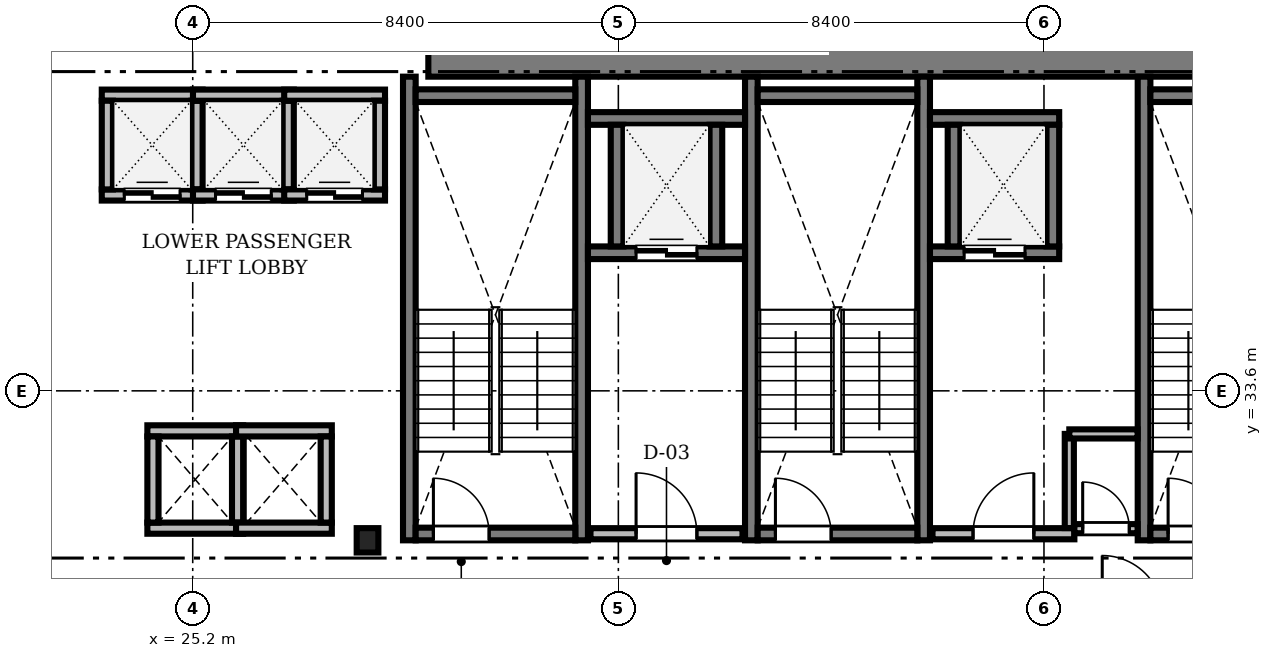
"""IFC4 building model, lengths in metres.
Left out: names, types, materials, properties, quantities, classifications, styles, units other than length and angle.
Written with IfcOpenShell. Run it as: python <this file> out.ifc"""

import sys

from ifc_helpers import new_model, si_unit, direction, frame, frame_2d, origin, origin_2d, place, context, subcontext, project, spatial, rectangle, i_section, extrude, source, transform, mapped, element, fill, save


model = new_model("IFC4")
c1 = context("Model", 3, precision=1e-05, world=origin(), true_north=direction((0.0, 1.0)))
c2 = subcontext(c1, "Body", "Model", "MODEL_VIEW")
j1 = project(units=[si_unit("LENGTHUNIT", "METRE"), si_unit("PLANEANGLEUNIT", "RADIAN")], contexts=[c1])
p1 = place(None, origin())
s1 = spatial("IfcSite", under=j1, at=p1, CompositionType="ELEMENT")
p2 = place(p1, origin())
s2 = spatial("IfcBuilding", under=s1, at=p2, CompositionType="ELEMENT")
p3 = place(p2, frame((0.0, 0.0, 89.65)))
s3 = spatial("IfcBuildingStorey", under=s2, at=p3, CompositionType="ELEMENT", Elevation=89.65)
m1 = source(origin(), c2, "Body", "SweptSolid", [
    extrude(rectangle(XDim=17.52, YDim=1.0, at=frame_2d((8.76, 0.0))), origin(), (0.0, 0.0, 1.0), 3.0),
])
p4 = place(p3, frame((29.85, 40.3, 0.0), z_axis=(0.0, 0.0, 1.0), x_axis=(1.0, 0.0, 0.0)))
e1 = element("IfcWall", 1, at=p4, inside=s3, PredefinedType="SHEAR", context=c2, shape_type="MappedRepresentation", body=[
    mapped(m1, transform((0.0, 0.0, 0.0), scale=1.0)),
])
m2 = source(origin(), c2, "Body", "SweptSolid", [
    extrude(i_section(OverallWidth=0.428, OverallDepth=0.481, WebThickness=0.04, FlangeThickness=0.063, FilletRadius=0.015, at=origin_2d()), origin(), (0.0, 0.0, 1.0), 3.0),
])
p5 = place(p3, frame((28.65, 30.65, 0.0), z_axis=(0.0, 0.0, 1.0), x_axis=(1.0, 0.0, 0.0)))
e2 = element("IfcColumn", 2, at=p5, inside=s3, PredefinedType="COLUMN", context=c2, shape_type="MappedRepresentation", body=[
    mapped(m2, transform((0.0, 0.0, 0.0), scale=1.0)),
])
m3 = source(origin(), c2, "Body", "SweptSolid", [
    extrude(rectangle(XDim=9.15, YDim=0.25, at=frame_2d((4.575, 0.0))), origin(), (0.0, 0.0, 1.0), 3.45),
])
for number, where, z_axis, x_axis in (
    (3, (29.475, 30.65, 0.0), (0.0, 0.0, 1.0), (0.0, 1.0, 0.0)),
    (4, (32.875, 30.65, 0.0), (0.0, 0.0, 1.0), (0.0, 1.0, 0.0)),
):
    element("IfcWall", number, at=place(p3, frame(where, z_axis=z_axis, x_axis=x_axis)), inside=s3, PredefinedType="SOLIDWALL", context=c2, shape_type="MappedRepresentation", body=[
        mapped(m3, transform((0.0, 0.0, 0.0), scale=1.0)),
    ])
m4 = source(origin(), c2, "Body", "SweptSolid", [
    extrude(rectangle(XDim=3.15, YDim=0.25, at=frame_2d((1.575, 0.0))), origin(), (0.0, 0.0, 1.0), 3.45),
])
p6 = place(p3, frame((29.6, 39.425, 0.0), z_axis=(0.0, 0.0, 1.0), x_axis=(1.0, 0.0, 0.0)))
e5 = element("IfcWall", 5, at=p6, inside=s3, PredefinedType="SOLIDWALL", context=c2, shape_type="MappedRepresentation", body=[
    mapped(m4, transform((0.0, 0.0, 0.0), scale=1.0)),
])
p7 = place(p3, frame((29.6, 30.775, 0.0), z_axis=(0.0, 0.0, 1.0), x_axis=(1.0, 0.0, 0.0)))
e6 = element("IfcWall", 6, at=p7, inside=s3, PredefinedType="SOLIDWALL", context=c2, shape_type="MappedRepresentation", body=[
    mapped(m4, transform((0.0, 0.0, 0.0), scale=1.0)),
])
m5 = source(origin(), c2, "Body", "SweptSolid", [
    extrude(rectangle(XDim=1.1, YDim=2.2, at=frame_2d((0.55, 1.1))), frame((0.0, 0.135, 0.0), z_axis=(0.0, -1.0, 0.0), x_axis=(1.0, 0.0, 0.0)), (0.0, 0.0, 1.0), 0.27),
])
p8 = place(p7, frame((0.35, 0.0, 0.0)))
e7 = element("IfcOpeningElement", 7, at=p8, cuts=e6, PredefinedType="OPENING", context=c2, shape_type="MappedRepresentation", body=[
    mapped(m5, transform((0.0, 0.0, 0.0), scale=1.0)),
])
for number, where, z_axis, x_axis in (
    (8, (36.225, 30.65, 0.0), (0.0, 0.0, 1.0), (0.0, 1.0, 0.0)),
    (9, (39.625, 30.65, 0.0), (0.0, 0.0, 1.0), (0.0, 1.0, 0.0)),
):
    element("IfcWall", number, at=place(p3, frame(where, z_axis=z_axis, x_axis=x_axis)), inside=s3, PredefinedType="SOLIDWALL", context=c2, shape_type="MappedRepresentation", body=[
        mapped(m3, transform((0.0, 0.0, 0.0), scale=1.0)),
    ])
p9 = place(p3, frame((36.35, 39.425, 0.0), z_axis=(0.0, 0.0, 1.0), x_axis=(1.0, 0.0, 0.0)))
e10 = element("IfcWall", 10, at=p9, inside=s3, PredefinedType="SOLIDWALL", context=c2, shape_type="MappedRepresentation", body=[
    mapped(m4, transform((0.0, 0.0, 0.0), scale=1.0)),
])
p10 = place(p3, frame((36.35, 30.775, 0.0), z_axis=(0.0, 0.0, 1.0), x_axis=(1.0, 0.0, 0.0)))
e11 = element("IfcWall", 11, at=p10, inside=s3, PredefinedType="SOLIDWALL", context=c2, shape_type="MappedRepresentation", body=[
    mapped(m4, transform((0.0, 0.0, 0.0), scale=1.0)),
])
p11 = place(p10, frame((0.35, 0.0, 0.0)))
e12 = element("IfcOpeningElement", 12, at=p11, cuts=e11, PredefinedType="OPENING", context=c2, shape_type="MappedRepresentation", body=[
    mapped(m5, transform((0.0, 0.0, 0.0), scale=1.0)),
])
p12 = place(p3, frame((43.975, 30.65, 0.0), z_axis=(0.0, 0.0, 1.0), x_axis=(0.0, 1.0, 0.0)))
e13 = element("IfcWall", 13, at=p12, inside=s3, PredefinedType="SOLIDWALL", context=c2, shape_type="MappedRepresentation", body=[
    mapped(m3, transform((0.0, 0.0, 0.0), scale=1.0)),
])
p13 = place(p3, frame((44.1, 39.425, 0.0), z_axis=(0.0, 0.0, 1.0), x_axis=(1.0, 0.0, 0.0)))
e14 = element("IfcWall", 14, at=p13, inside=s3, PredefinedType="SOLIDWALL", context=c2, shape_type="MappedRepresentation", body=[
    mapped(m4, transform((0.0, 0.0, 0.0), scale=1.0)),
])
p14 = place(p3, frame((44.1, 30.775, 0.0), z_axis=(0.0, 0.0, 1.0), x_axis=(1.0, 0.0, 0.0)))
e15 = element("IfcWall", 15, at=p14, inside=s3, PredefinedType="SOLIDWALL", context=c2, shape_type="MappedRepresentation", body=[
    mapped(m4, transform((0.0, 0.0, 0.0), scale=1.0)),
])
p15 = place(p14, frame((0.35, 0.0, 0.0)))
e16 = element("IfcOpeningElement", 16, at=p15, cuts=e15, PredefinedType="OPENING", context=c2, shape_type="MappedRepresentation", body=[
    mapped(m5, transform((0.0, 0.0, 0.0), scale=1.0)),
])
m6 = source(origin(), c2, "Body", "SweptSolid", [
    extrude(rectangle(XDim=3.0, YDim=0.22, at=frame_2d((1.5, 0.0))), origin(), (0.0, 0.0, 1.0), 3.0),
])
p16 = place(p3, frame((33.05, 30.78, 0.0), z_axis=(0.0, 0.0, 1.0), x_axis=(1.0, 0.0, 0.0)))
e17 = element("IfcWall", 17, at=p16, inside=s3, PredefinedType="SOLIDWALL", context=c2, shape_type="MappedRepresentation", body=[
    mapped(m6, transform((0.0, 0.0, 0.0), scale=1.0)),
])
m7 = source(origin(), c2, "Body", "SweptSolid", [
    extrude(rectangle(XDim=1.2, YDim=2.2, at=frame_2d((0.6, 1.1))), frame((0.0, 0.12, 0.0), z_axis=(0.0, -1.0, 0.0), x_axis=(1.0, 0.0, 0.0)), (0.0, 0.0, 1.0), 0.24),
])
p17 = place(p16, frame((0.9, 0.0, 0.0)))
e18 = element("IfcOpeningElement", 18, at=p17, cuts=e17, PredefinedType="OPENING", context=c2, shape_type="MappedRepresentation", body=[
    mapped(m7, transform((0.0, 0.0, 0.0), scale=1.0)),
])
m8 = source(origin(), c2, "Body", "SweptSolid", [
    extrude(rectangle(XDim=2.8, YDim=0.22, at=frame_2d((1.4, 0.0))), origin(), (0.0, 0.0, 1.0), 3.0),
])
p18 = place(p3, frame((39.8, 30.78, 0.0), z_axis=(0.0, 0.0, 1.0), x_axis=(1.0, 0.0, 0.0)))
e19 = element("IfcWall", 19, at=p18, inside=s3, PredefinedType="SOLIDWALL", context=c2, shape_type="MappedRepresentation", body=[
    mapped(m8, transform((0.0, 0.0, 0.0), scale=1.0)),
])
p19 = place(p18, frame((0.8, 0.0, 0.0)))
e20 = element("IfcOpeningElement", 20, at=p19, cuts=e19, PredefinedType="OPENING", context=c2, shape_type="MappedRepresentation", body=[
    mapped(m7, transform((0.0, 0.0, 0.0), scale=1.0)),
])
m9 = source(origin(), c2, "Body", "SweptSolid", [
    extrude(rectangle(XDim=1.99, YDim=0.22, at=frame_2d((0.995, 0.0))), origin(), (0.0, 0.0, 1.0), 3.0),
])
p20 = place(p3, frame((23.405, 37.465, 0.0), z_axis=(0.0, 0.0, 1.0), x_axis=(1.0, 0.0, 0.0)))
e21 = element("IfcWall", 21, at=p20, inside=s3, PredefinedType="SOLIDWALL", context=c2, shape_type="MappedRepresentation", body=[
    mapped(m9, transform((0.0, 0.0, 0.0), scale=1.0)),
])
m10 = source(origin(), c2, "Body", "SweptSolid", [
    extrude(rectangle(XDim=1.1, YDim=2.2, at=frame_2d((0.55, 1.1))), frame((0.0, 0.12, 0.0), z_axis=(0.0, -1.0, 0.0), x_axis=(1.0, 0.0, 0.0)), (0.0, 0.0, 1.0), 0.24),
])
p21 = place(p20, frame((0.445, 0.0, 0.0)))
e22 = element("IfcOpeningElement", 22, at=p21, cuts=e21, PredefinedType="OPENING", context=c2, shape_type="MappedRepresentation", body=[
    mapped(m10, transform((0.0, 0.0, 0.0), scale=1.0)),
])
p22 = place(p3, frame((23.405, 39.435, 0.0), z_axis=(0.0, 0.0, 1.0), x_axis=(1.0, 0.0, 0.0)))
e23 = element("IfcWall", 23, at=p22, inside=s3, PredefinedType="SOLIDWALL", context=c2, shape_type="MappedRepresentation", body=[
    mapped(m9, transform((0.0, 0.0, 0.0), scale=1.0)),
])
m11 = source(origin(), c2, "Body", "SweptSolid", [
    extrude(rectangle(XDim=1.75, YDim=0.22, at=frame_2d((0.875, 0.0))), origin(), (0.0, 0.0, 1.0), 3.0),
])
for number, where, z_axis, x_axis in (
    (24, (23.515, 37.575, 0.0), (0.0, 0.0, 1.0), (0.0, 1.0, 0.0)),
    (25, (25.285, 37.575, 0.0), (0.0, 0.0, 1.0), (0.0, 1.0, 0.0)),
):
    element("IfcWall", number, at=place(p3, frame(where, z_axis=z_axis, x_axis=x_axis)), inside=s3, PredefinedType="SOLIDWALL", context=c2, shape_type="MappedRepresentation", body=[
        mapped(m11, transform((0.0, 0.0, 0.0), scale=1.0)),
    ])
p23 = place(p3, frame((25.205, 37.465, 0.0), z_axis=(0.0, 0.0, 1.0), x_axis=(1.0, 0.0, 0.0)))
e26 = element("IfcWall", 26, at=p23, inside=s3, PredefinedType="SOLIDWALL", context=c2, shape_type="MappedRepresentation", body=[
    mapped(m9, transform((0.0, 0.0, 0.0), scale=1.0)),
])
p24 = place(p23, frame((0.445, 0.0, 0.0)))
e27 = element("IfcOpeningElement", 27, at=p24, cuts=e26, PredefinedType="OPENING", context=c2, shape_type="MappedRepresentation", body=[
    mapped(m10, transform((0.0, 0.0, 0.0), scale=1.0)),
])
p25 = place(p3, frame((25.205, 39.435, 0.0), z_axis=(0.0, 0.0, 1.0), x_axis=(1.0, 0.0, 0.0)))
e28 = element("IfcWall", 28, at=p25, inside=s3, PredefinedType="SOLIDWALL", context=c2, shape_type="MappedRepresentation", body=[
    mapped(m9, transform((0.0, 0.0, 0.0), scale=1.0)),
])
p26 = place(p3, frame((27.085, 37.575, 0.0), z_axis=(0.0, 0.0, 1.0), x_axis=(0.0, 1.0, 0.0)))
e29 = element("IfcWall", 29, at=p26, inside=s3, PredefinedType="SOLIDWALL", context=c2, shape_type="MappedRepresentation", body=[
    mapped(m11, transform((0.0, 0.0, 0.0), scale=1.0)),
])
m12 = source(origin(), c2, "Body", "SweptSolid", [
    extrude(rectangle(XDim=1.99, YDim=0.22, at=frame_2d((0.995, 0.0))), origin(), (0.0, 0.0, 1.0), 3.0),
])
p27 = place(p3, frame((27.005, 37.465, 0.0), z_axis=(0.0, 0.0, 1.0), x_axis=(1.0, 0.0, 0.0)))
e30 = element("IfcWall", 30, at=p27, inside=s3, PredefinedType="SOLIDWALL", context=c2, shape_type="MappedRepresentation", body=[
    mapped(m12, transform((0.0, 0.0, 0.0), scale=1.0)),
])
p28 = place(p27, frame((0.445, 0.0, 0.0)))
e31 = element("IfcOpeningElement", 31, at=p28, cuts=e30, PredefinedType="OPENING", context=c2, shape_type="MappedRepresentation", body=[
    mapped(m10, transform((0.0, 0.0, 0.0), scale=1.0)),
])
p29 = place(p3, frame((27.005, 39.435, 0.0), z_axis=(0.0, 0.0, 1.0), x_axis=(1.0, 0.0, 0.0)))
e32 = element("IfcWall", 32, at=p29, inside=s3, PredefinedType="SOLIDWALL", context=c2, shape_type="MappedRepresentation", body=[
    mapped(m12, transform((0.0, 0.0, 0.0), scale=1.0)),
])
p30 = place(p3, frame((28.885, 37.575, 0.0), z_axis=(0.0, 0.0, 1.0), x_axis=(0.0, 1.0, 0.0)))
e33 = element("IfcWall", 33, at=p30, inside=s3, PredefinedType="SOLIDWALL", context=c2, shape_type="MappedRepresentation", body=[
    mapped(m11, transform((0.0, 0.0, 0.0), scale=1.0)),
])
m13 = source(origin(), c2, "Body", "SweptSolid", [
    extrude(rectangle(XDim=3.1, YDim=0.25, at=frame_2d((1.55, 0.0))), origin(), (0.0, 0.0, 1.0), 3.0),
])
p31 = place(p3, frame((33.0, 36.325, 0.0), z_axis=(0.0, 0.0, 1.0), x_axis=(1.0, 0.0, 0.0)))
e34 = element("IfcWall", 34, at=p31, inside=s3, PredefinedType="SOLIDWALL", context=c2, shape_type="MappedRepresentation", body=[
    mapped(m13, transform((0.0, 0.0, 0.0), scale=1.0)),
])
m14 = source(origin(), c2, "Body", "SweptSolid", [
    extrude(rectangle(XDim=1.2, YDim=2.25, at=frame_2d((0.6, 1.125))), frame((0.0, 0.135, 0.0), z_axis=(0.0, -1.0, 0.0), x_axis=(1.0, 0.0, 0.0)), (0.0, 0.0, 1.0), 0.27),
])
p32 = place(p31, frame((0.95, 0.0, 0.0)))
e35 = element("IfcOpeningElement", 35, at=p32, cuts=e34, PredefinedType="OPENING", context=c2, shape_type="MappedRepresentation", body=[
    mapped(m14, transform((0.0, 0.0, 0.0), scale=1.0)),
])
p33 = place(p3, frame((33.0, 38.975, 0.0), z_axis=(0.0, 0.0, 1.0), x_axis=(1.0, 0.0, 0.0)))
e36 = element("IfcWall", 36, at=p33, inside=s3, PredefinedType="SOLIDWALL", context=c2, shape_type="MappedRepresentation", body=[
    mapped(m13, transform((0.0, 0.0, 0.0), scale=1.0)),
])
m15 = source(origin(), c2, "Body", "SweptSolid", [
    extrude(rectangle(XDim=2.4, YDim=0.25, at=frame_2d((1.2, 0.0))), origin(), (0.0, 0.0, 1.0), 3.0),
])
for number, where, z_axis, x_axis in (
    (37, (33.575, 36.45, 0.0), (0.0, 0.0, 1.0), (0.0, 1.0, 0.0)),
    (38, (35.525, 36.45, 0.0), (0.0, 0.0, 1.0), (0.0, 1.0, 0.0)),
):
    element("IfcWall", number, at=place(p3, frame(where, z_axis=z_axis, x_axis=x_axis)), inside=s3, PredefinedType="SOLIDWALL", context=c2, shape_type="MappedRepresentation", body=[
        mapped(m15, transform((0.0, 0.0, 0.0), scale=1.0)),
    ])
m16 = source(origin(), c2, "Body", "SweptSolid", [
    extrude(rectangle(XDim=2.55, YDim=0.25, at=frame_2d((1.275, 0.0))), origin(), (0.0, 0.0, 1.0), 3.0),
])
p34 = place(p3, frame((39.75, 36.325, 0.0), z_axis=(0.0, 0.0, 1.0), x_axis=(1.0, 0.0, 0.0)))
e39 = element("IfcWall", 39, at=p34, inside=s3, PredefinedType="SOLIDWALL", context=c2, shape_type="MappedRepresentation", body=[
    mapped(m16, transform((0.0, 0.0, 0.0), scale=1.0)),
])
p35 = place(p34, frame((0.675, 0.0, 0.0)))
e40 = element("IfcOpeningElement", 40, at=p35, cuts=e39, PredefinedType="OPENING", context=c2, shape_type="MappedRepresentation", body=[
    mapped(m14, transform((0.0, 0.0, 0.0), scale=1.0)),
])
p36 = place(p3, frame((39.75, 38.975, 0.0), z_axis=(0.0, 0.0, 1.0), x_axis=(1.0, 0.0, 0.0)))
e41 = element("IfcWall", 41, at=p36, inside=s3, PredefinedType="SOLIDWALL", context=c2, shape_type="MappedRepresentation", body=[
    mapped(m16, transform((0.0, 0.0, 0.0), scale=1.0)),
])
for number, where, z_axis, x_axis in (
    (42, (40.225, 36.45, 0.0), (0.0, 0.0, 1.0), (0.0, 1.0, 0.0)),
    (43, (42.175, 36.45, 0.0), (0.0, 0.0, 1.0), (0.0, 1.0, 0.0)),
):
    element("IfcWall", number, at=place(p3, frame(where, z_axis=z_axis, x_axis=x_axis)), inside=s3, PredefinedType="SOLIDWALL", context=c2, shape_type="MappedRepresentation", body=[
        mapped(m15, transform((0.0, 0.0, 0.0), scale=1.0)),
    ])
m17 = source(origin(), c2, "Body", "SweptSolid", [
    extrude(rectangle(XDim=1.89, YDim=0.22, at=frame_2d((0.945, 0.0))), origin(), (0.0, 0.0, 1.0), 3.0),
])
for number, where, z_axis, x_axis in (
    (44, (24.305, 30.89, 0.0), (0.0, 0.0, 1.0), (1.0, 0.0, 0.0)),
    (45, (24.305, 32.81, 0.0), (0.0, 0.0, 1.0), (1.0, 0.0, 0.0)),
):
    element("IfcWall", number, at=place(p3, frame(where, z_axis=z_axis, x_axis=x_axis)), inside=s3, PredefinedType="SOLIDWALL", context=c2, shape_type="MappedRepresentation", body=[
        mapped(m17, transform((0.0, 0.0, 0.0), scale=1.0)),
    ])
m18 = source(origin(), c2, "Body", "SweptSolid", [
    extrude(rectangle(XDim=1.7, YDim=0.22, at=frame_2d((0.85, 0.0))), origin(), (0.0, 0.0, 1.0), 3.0),
])
for number, where, z_axis, x_axis in (
    (46, (24.415, 31.0, 0.0), (0.0, 0.0, 1.0), (0.0, 1.0, 0.0)),
    (47, (26.085, 31.0, 0.0), (0.0, 0.0, 1.0), (0.0, 1.0, 0.0)),
):
    element("IfcWall", number, at=place(p3, frame(where, z_axis=z_axis, x_axis=x_axis)), inside=s3, PredefinedType="SOLIDWALL", context=c2, shape_type="MappedRepresentation", body=[
        mapped(m18, transform((0.0, 0.0, 0.0), scale=1.0)),
    ])
for number, where, z_axis, x_axis in (
    (48, (26.055, 30.89, 0.0), (0.0, 0.0, 1.0), (1.0, 0.0, 0.0)),
    (49, (26.055, 32.81, 0.0), (0.0, 0.0, 1.0), (1.0, 0.0, 0.0)),
):
    element("IfcWall", number, at=place(p3, frame(where, z_axis=z_axis, x_axis=x_axis)), inside=s3, PredefinedType="SOLIDWALL", context=c2, shape_type="MappedRepresentation", body=[
        mapped(m17, transform((0.0, 0.0, 0.0), scale=1.0)),
    ])
p37 = place(p3, frame((27.835, 31.0, 0.0), z_axis=(0.0, 0.0, 1.0), x_axis=(0.0, 1.0, 0.0)))
e50 = element("IfcWall", 50, at=p37, inside=s3, PredefinedType="SOLIDWALL", context=c2, shape_type="MappedRepresentation", body=[
    mapped(m18, transform((0.0, 0.0, 0.0), scale=1.0)),
])
m19 = source(origin(), c2, "Body", "SweptSolid", [
    extrude(rectangle(XDim=1.248, YDim=0.18, at=frame_2d((0.624, 0.0))), origin(), (0.0, 0.0, 1.0), 3.0),
])
p38 = place(p3, frame((42.6, 30.88, 0.0), z_axis=(0.0, 0.0, 1.0), x_axis=(1.0, 0.0, 0.0)))
e51 = element("IfcWall", 51, at=p38, inside=s3, PredefinedType="PARTITIONING", context=c2, shape_type="MappedRepresentation", body=[
    mapped(m19, transform((0.0, 0.0, 0.0), scale=1.0)),
])
m20 = source(origin(), c2, "Body", "SweptSolid", [
    extrude(rectangle(XDim=0.92, YDim=2.1, at=frame_2d((0.46, 1.05))), frame((0.0, 0.1, 0.0), z_axis=(0.0, -1.0, 0.0), x_axis=(1.0, 0.0, 0.0)), (0.0, 0.0, 1.0), 0.2),
])
p39 = place(p38, frame((0.164, 0.0, 0.0)))
e52 = element("IfcOpeningElement", 52, at=p39, cuts=e51, PredefinedType="OPENING", context=c2, shape_type="MappedRepresentation", body=[
    mapped(m20, transform((0.0, 0.0, 0.0), scale=1.0)),
])
m21 = source(origin(), c2, "Body", "SweptSolid", [
    extrude(rectangle(XDim=1.858, YDim=0.18, at=frame_2d((0.929, 0.0))), origin(), (0.0, 0.0, 1.0), 3.0),
])
p40 = place(p3, frame((42.5, 30.892, 0.0), z_axis=(0.0, 0.0, 1.0), x_axis=(0.0, 1.0, 0.0)))
e53 = element("IfcWall", 53, at=p40, inside=s3, PredefinedType="PARTITIONING", context=c2, shape_type="MappedRepresentation", body=[
    mapped(m21, transform((0.0, 0.0, 0.0), scale=1.0)),
])
m22 = source(origin(), c2, "Body", "SweptSolid", [
    extrude(rectangle(XDim=1.348, YDim=0.18, at=frame_2d((0.674, 0.0))), origin(), (0.0, 0.0, 1.0), 3.0),
])
p41 = place(p3, frame((42.5, 32.75, 0.0), z_axis=(0.0, 0.0, 1.0), x_axis=(1.0, 0.0, 0.0)))
e54 = element("IfcWall", 54, at=p41, inside=s3, PredefinedType="PARTITIONING", context=c2, shape_type="MappedRepresentation", body=[
    mapped(m22, transform((0.0, 0.0, 0.0), scale=1.0)),
])
m23 = source(origin(), c2, "Body", "SweptSolid", [
    extrude(rectangle(XDim=1.1, YDim=2.2, at=frame_2d((0.55, 1.1))), frame((0.0, 0.025, 0.0), z_axis=(0.0, -1.0, 0.0), x_axis=(1.0, 0.0, 0.0)), (0.0, 0.0, 1.0), 0.05),
])
p42 = place(p8, origin())
e55 = element("IfcDoor", 55, at=p42, inside=s3, OperationType="SINGLE_SWING_LEFT", PredefinedType="DOOR", context=c2, shape_type="MappedRepresentation", body=[
    mapped(m23, transform((0.0, 0.0, 0.0), scale=1.0)),
])
fill(e7, e55)
p43 = place(p11, origin())
e56 = element("IfcDoor", 56, at=p43, inside=s3, OperationType="SINGLE_SWING_LEFT", PredefinedType="DOOR", context=c2, shape_type="MappedRepresentation", body=[
    mapped(m23, transform((0.0, 0.0, 0.0), scale=1.0)),
])
fill(e12, e56)
p44 = place(p15, origin())
e57 = element("IfcDoor", 57, at=p44, inside=s3, OperationType="SINGLE_SWING_LEFT", PredefinedType="DOOR", context=c2, shape_type="MappedRepresentation", body=[
    mapped(m23, transform((0.0, 0.0, 0.0), scale=1.0)),
])
fill(e16, e57)
m24 = source(origin(), c2, "Body", "SweptSolid", [
    extrude(rectangle(XDim=1.2, YDim=2.2, at=frame_2d((0.6, 1.1))), frame((0.0, 0.025, 0.0), z_axis=(0.0, -1.0, 0.0), x_axis=(1.0, 0.0, 0.0)), (0.0, 0.0, 1.0), 0.05),
])
p45 = place(p17, origin())
e58 = element("IfcDoor", 58, at=p45, inside=s3, OperationType="SINGLE_SWING_LEFT", PredefinedType="DOOR", context=c2, shape_type="MappedRepresentation", body=[
    mapped(m24, transform((0.0, 0.0, 0.0), scale=1.0)),
])
fill(e18, e58)
p46 = place(p19, origin())
e59 = element("IfcDoor", 59, at=p46, inside=s3, OperationType="SINGLE_SWING_RIGHT", PredefinedType="DOOR", context=c2, shape_type="MappedRepresentation", body=[
    mapped(m24, transform((0.0, 0.0, 0.0), scale=1.0)),
])
fill(e20, e59)
p47 = place(p21, origin())
e60 = element("IfcDoor", 60, at=p47, inside=s3, OperationType="DOUBLE_DOOR_SLIDING", PredefinedType="DOOR", context=c2, shape_type="MappedRepresentation", body=[
    mapped(m23, transform((0.0, 0.0, 0.0), scale=1.0)),
])
fill(e22, e60)
p48 = place(p24, origin())
e61 = element("IfcDoor", 61, at=p48, inside=s3, OperationType="DOUBLE_DOOR_SLIDING", PredefinedType="DOOR", context=c2, shape_type="MappedRepresentation", body=[
    mapped(m23, transform((0.0, 0.0, 0.0), scale=1.0)),
])
fill(e27, e61)
p49 = place(p28, origin())
e62 = element("IfcDoor", 62, at=p49, inside=s3, OperationType="DOUBLE_DOOR_SLIDING", PredefinedType="DOOR", context=c2, shape_type="MappedRepresentation", body=[
    mapped(m23, transform((0.0, 0.0, 0.0), scale=1.0)),
])
fill(e31, e62)
m25 = source(origin(), c2, "Body", "SweptSolid", [
    extrude(rectangle(XDim=1.2, YDim=2.25, at=frame_2d((0.6, 1.125))), frame((0.0, 0.025, 0.0), z_axis=(0.0, -1.0, 0.0), x_axis=(1.0, 0.0, 0.0)), (0.0, 0.0, 1.0), 0.05),
])
p50 = place(p32, origin())
e63 = element("IfcDoor", 63, at=p50, inside=s3, OperationType="DOUBLE_DOOR_SLIDING", PredefinedType="DOOR", context=c2, shape_type="MappedRepresentation", body=[
    mapped(m25, transform((0.0, 0.0, 0.0), scale=1.0)),
])
fill(e35, e63)
p51 = place(p35, origin())
e64 = element("IfcDoor", 64, at=p51, inside=s3, OperationType="DOUBLE_DOOR_SLIDING", PredefinedType="DOOR", context=c2, shape_type="MappedRepresentation", body=[
    mapped(m25, transform((0.0, 0.0, 0.0), scale=1.0)),
])
fill(e40, e64)
m26 = source(origin(), c2, "Body", "SweptSolid", [
    extrude(rectangle(XDim=0.92, YDim=2.1, at=frame_2d((0.46, 1.05))), frame((0.0, 0.025, 0.0), z_axis=(0.0, -1.0, 0.0), x_axis=(1.0, 0.0, 0.0)), (0.0, 0.0, 1.0), 0.05),
])
p52 = place(p39, origin())
e65 = element("IfcDoor", 65, at=p52, inside=s3, OperationType="SINGLE_SWING_LEFT", PredefinedType="DOOR", context=c2, shape_type="MappedRepresentation", body=[
    mapped(m26, transform((0.0, 0.0, 0.0), scale=1.0)),
])
fill(e52, e65)
save(model, sys.argv[1])
